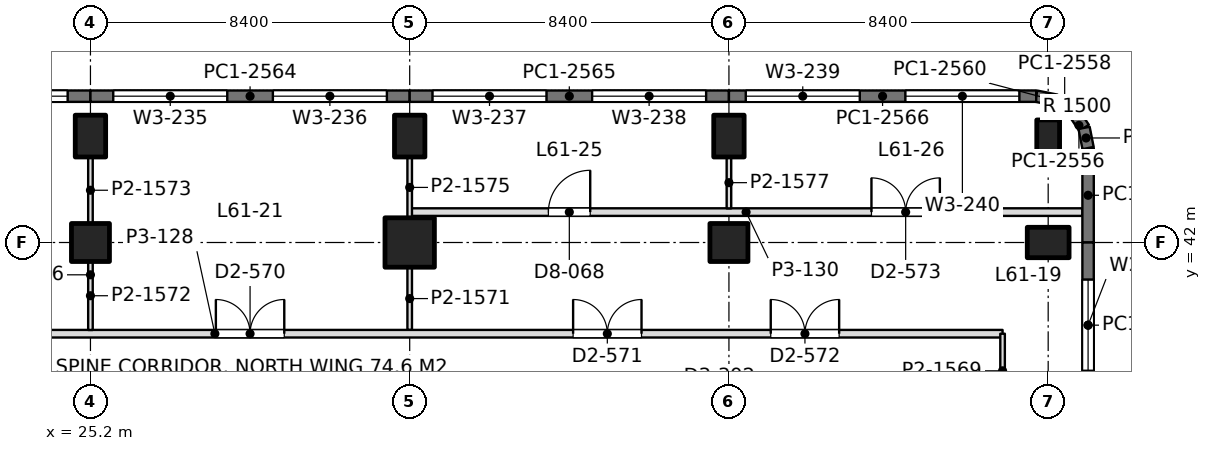
"""IFC4 building model, lengths in metres.
Left out: names, types, materials, properties, quantities, classifications, styles, units other than length and angle.
Written with IfcOpenShell. Run it as: python <this file> out.ifc"""

import sys

from ifc_helpers import new_model, si_unit, direction, frame, frame_2d, origin, origin_2d, place, context, subcontext, project, spatial, rectangle, extrude, element, fill, save


model = new_model("IFC4")
c1 = context("Model", 3, precision=1e-05, world=origin(), true_north=direction((0.0, 1.0)))
c2 = subcontext(c1, "Body", "Model", "MODEL_VIEW")
j1 = project(units=[si_unit("LENGTHUNIT", "METRE"), si_unit("PLANEANGLEUNIT", "RADIAN")], contexts=[c1])
p1 = place(None, origin())
s1 = spatial("IfcSite", under=j1, at=p1, CompositionType="ELEMENT")
p2 = place(p1, origin())
s2 = spatial("IfcBuilding", under=s1, at=p2, CompositionType="ELEMENT")
p3 = place(p2, frame((0.0, 0.0, 268.2)))
s3 = spatial("IfcBuildingStorey", under=s2, at=p3, CompositionType="ELEMENT", Elevation=268.2)
p4 = place(p3, frame((25.2, 42.0, 0.0), z_axis=(0.0, 0.0, 1.0), x_axis=(1.0, 0.0, 0.0)))
e1 = element("IfcColumn", 1, at=p4, inside=s3, PredefinedType="COLUMN", context=c2, shape_type="SweptSolid", body=[
    extrude(rectangle(XDim=1.0, YDim=1.0, at=origin_2d()), origin(), (0.0, 0.0, 1.0), 4.5),
])
p5 = place(p3, frame((25.2, 44.8, 0.0), z_axis=(0.0, 0.0, 1.0), x_axis=(1.0, 0.0, 0.0)))
e2 = element("IfcColumn", 2, at=p5, inside=s3, PredefinedType="COLUMN", context=c2, shape_type="SweptSolid", body=[
    extrude(rectangle(XDim=0.8, YDim=1.1, at=origin_2d()), origin(), (0.0, 0.0, 1.0), 4.5),
])
p6 = place(p3, frame((33.6, 42.0, 0.0), z_axis=(0.0, 0.0, 1.0), x_axis=(1.0, 0.0, 0.0)))
e3 = element("IfcColumn", 3, at=p6, inside=s3, PredefinedType="COLUMN", context=c2, shape_type="SweptSolid", body=[
    extrude(rectangle(XDim=1.3, YDim=1.3, at=origin_2d()), origin(), (0.0, 0.0, 1.0), 4.5),
])
p7 = place(p3, frame((33.6, 44.8, 0.0), z_axis=(0.0, 0.0, 1.0), x_axis=(1.0, 0.0, 0.0)))
e4 = element("IfcColumn", 4, at=p7, inside=s3, PredefinedType="COLUMN", context=c2, shape_type="SweptSolid", body=[
    extrude(rectangle(XDim=0.8, YDim=1.1, at=origin_2d()), origin(), (0.0, 0.0, 1.0), 4.5),
])
p8 = place(p3, frame((42.0, 42.0, 0.0), z_axis=(0.0, 0.0, 1.0), x_axis=(1.0, 0.0, 0.0)))
e5 = element("IfcColumn", 5, at=p8, inside=s3, PredefinedType="COLUMN", context=c2, shape_type="SweptSolid", body=[
    extrude(rectangle(XDim=1.0, YDim=1.0, at=origin_2d()), origin(), (0.0, 0.0, 1.0), 4.5),
])
for number, where, z_axis, x_axis in (
    (6, (42.0, 44.8, 0.0), (0.0, 0.0, 1.0), (1.0, 0.0, 0.0)),
    (7, (50.4, 42.0, 0.0), (0.0, 0.0, 1.0), (0.0, 1.0, 0.0)),
):
    element("IfcColumn", number, at=place(p3, frame(where, z_axis=z_axis, x_axis=x_axis)), inside=s3, PredefinedType="COLUMN", context=c2, shape_type="SweptSolid", body=[
        extrude(rectangle(XDim=0.8, YDim=1.1, at=origin_2d()), origin(), (0.0, 0.0, 1.0), 4.5),
    ])
p9 = place(p3, frame((50.4, 44.8, 0.0), z_axis=(0.0, 0.0, 1.0), x_axis=(1.0, 0.0, 0.0)))
e8 = element("IfcColumn", 8, at=p9, inside=s3, PredefinedType="COLUMN", context=c2, shape_type="SweptSolid", body=[
    extrude(rectangle(XDim=0.6, YDim=0.85, at=origin_2d()), origin(), (0.0, 0.0, 1.0), 4.5),
])
p10 = place(p3, frame((16.8, 45.85, 0.0), z_axis=(0.0, 0.0, 1.0), x_axis=(1.0, 0.0, 0.0)))
e9 = element("IfcWall", 9, at=p10, inside=s3, PredefinedType="SOLIDWALL", context=c2, shape_type="SweptSolid", body=[
    extrude(rectangle(XDim=8.4, YDim=0.3, at=frame_2d((4.2, 0.0))), origin(), (0.0, 0.0, 1.0), 4.35),
])
p11 = place(p10, frame((0.6, 0.0, 0.9)))
e10 = element("IfcOpeningElement", 10, at=p11, cuts=e9, PredefinedType="OPENING", context=c2, shape_type="SweptSolid", body=[
    extrude(rectangle(XDim=3.0, YDim=2.4, at=frame_2d((1.5, 1.2))), frame((0.0, 0.16, 0.0), z_axis=(0.0, -1.0, 0.0), x_axis=(1.0, 0.0, 0.0)), (0.0, 0.0, 1.0), 0.32),
])
p12 = place(p10, frame((4.8, 0.0, 0.9)))
e11 = element("IfcOpeningElement", 11, at=p12, cuts=e9, PredefinedType="OPENING", context=c2, shape_type="SweptSolid", body=[
    extrude(rectangle(XDim=3.0, YDim=2.4, at=frame_2d((1.5, 1.2))), frame((0.0, 0.16, 0.0), z_axis=(0.0, -1.0, 0.0), x_axis=(1.0, 0.0, 0.0)), (0.0, 0.0, 1.0), 0.32),
])
p13 = place(p3, frame((25.2, 45.85, 0.0), z_axis=(0.0, 0.0, 1.0), x_axis=(1.0, 0.0, 0.0)))
e12 = element("IfcWall", 12, at=p13, inside=s3, PredefinedType="SOLIDWALL", context=c2, shape_type="SweptSolid", body=[
    extrude(rectangle(XDim=8.4, YDim=0.3, at=frame_2d((4.2, 0.0))), origin(), (0.0, 0.0, 1.0), 4.35),
])
p14 = place(p13, frame((0.6, 0.0, 0.9)))
e13 = element("IfcOpeningElement", 13, at=p14, cuts=e12, PredefinedType="OPENING", context=c2, shape_type="SweptSolid", body=[
    extrude(rectangle(XDim=3.0, YDim=2.4, at=frame_2d((1.5, 1.2))), frame((0.0, 0.16, 0.0), z_axis=(0.0, -1.0, 0.0), x_axis=(1.0, 0.0, 0.0)), (0.0, 0.0, 1.0), 0.32),
])
p15 = place(p13, frame((4.8, 0.0, 0.9)))
e14 = element("IfcOpeningElement", 14, at=p15, cuts=e12, PredefinedType="OPENING", context=c2, shape_type="SweptSolid", body=[
    extrude(rectangle(XDim=3.0, YDim=2.4, at=frame_2d((1.5, 1.2))), frame((0.0, 0.16, 0.0), z_axis=(0.0, -1.0, 0.0), x_axis=(1.0, 0.0, 0.0)), (0.0, 0.0, 1.0), 0.32),
])
p16 = place(p3, frame((33.6, 45.85, 0.0), z_axis=(0.0, 0.0, 1.0), x_axis=(1.0, 0.0, 0.0)))
e15 = element("IfcWall", 15, at=p16, inside=s3, PredefinedType="SOLIDWALL", context=c2, shape_type="SweptSolid", body=[
    extrude(rectangle(XDim=8.4, YDim=0.3, at=frame_2d((4.2, 0.0))), origin(), (0.0, 0.0, 1.0), 4.35),
])
p17 = place(p16, frame((0.6, 0.0, 0.9)))
e16 = element("IfcOpeningElement", 16, at=p17, cuts=e15, PredefinedType="OPENING", context=c2, shape_type="SweptSolid", body=[
    extrude(rectangle(XDim=3.0, YDim=2.4, at=frame_2d((1.5, 1.2))), frame((0.0, 0.16, 0.0), z_axis=(0.0, -1.0, 0.0), x_axis=(1.0, 0.0, 0.0)), (0.0, 0.0, 1.0), 0.32),
])
p18 = place(p16, frame((4.8, 0.0, 0.9)))
e17 = element("IfcOpeningElement", 17, at=p18, cuts=e15, PredefinedType="OPENING", context=c2, shape_type="SweptSolid", body=[
    extrude(rectangle(XDim=3.0, YDim=2.4, at=frame_2d((1.5, 1.2))), frame((0.0, 0.16, 0.0), z_axis=(0.0, -1.0, 0.0), x_axis=(1.0, 0.0, 0.0)), (0.0, 0.0, 1.0), 0.32),
])
p19 = place(p3, frame((42.0, 45.85, 0.0), z_axis=(0.0, 0.0, 1.0), x_axis=(1.0, 0.0, 0.0)))
e18 = element("IfcWall", 18, at=p19, inside=s3, PredefinedType="SOLIDWALL", context=c2, shape_type="SweptSolid", body=[
    extrude(rectangle(XDim=8.085, YDim=0.3, at=frame_2d((4.042, 0.0))), origin(), (0.0, 0.0, 1.0), 4.35),
])
p20 = place(p19, frame((0.443, 0.0, 0.9)))
e19 = element("IfcOpeningElement", 19, at=p20, cuts=e18, PredefinedType="OPENING", context=c2, shape_type="SweptSolid", body=[
    extrude(rectangle(XDim=3.0, YDim=2.4, at=frame_2d((1.5, 1.2))), frame((0.0, 0.16, 0.0), z_axis=(0.0, -1.0, 0.0), x_axis=(1.0, 0.0, 0.0)), (0.0, 0.0, 1.0), 0.32),
])
p21 = place(p19, frame((4.643, 0.0, 0.9)))
e20 = element("IfcOpeningElement", 20, at=p21, cuts=e18, PredefinedType="OPENING", context=c2, shape_type="SweptSolid", body=[
    extrude(rectangle(XDim=3.0, YDim=2.4, at=frame_2d((1.5, 1.2))), frame((0.0, 0.16, 0.0), z_axis=(0.0, -1.0, 0.0), x_axis=(1.0, 0.0, 0.0)), (0.0, 0.0, 1.0), 0.32),
])
p22 = place(p3, frame((50.085, 45.85, 0.0), z_axis=(0.0, 0.0, 1.0), x_axis=(0.980702050465, -0.1955082817, 0.0)))
e21 = element("IfcWall", 21, at=p22, inside=s3, PredefinedType="SOLIDWALL", context=c2, shape_type="SweptSolid", body=[
    extrude(rectangle(XDim=0.541, YDim=0.3, at=frame_2d((0.271, 0.0))), origin(), (0.0, 0.0, 1.0), 4.35),
])
p23 = place(p3, frame((50.615, 45.744, 0.0), z_axis=(0.0, 0.0, 1.0), x_axis=(0.831692711774, -0.555236195849, 0.0)))
e22 = element("IfcWall", 22, at=p23, inside=s3, PredefinedType="SOLIDWALL", context=c2, shape_type="SweptSolid", body=[
    extrude(rectangle(XDim=0.525, YDim=0.3, at=frame_2d((0.263, 0.0))), origin(), (0.0, 0.0, 1.0), 4.35),
])
p24 = place(p3, frame((51.052, 45.453, 0.0), z_axis=(0.0, 0.0, 1.0), x_axis=(0.55534295404, -0.831621430339, 0.0)))
e23 = element("IfcWall", 23, at=p24, inside=s3, PredefinedType="SOLIDWALL", context=c2, shape_type="SweptSolid", body=[
    extrude(rectangle(XDim=0.526, YDim=0.3, at=frame_2d((0.263, 0.0))), origin(), (0.0, 0.0, 1.0), 4.35),
])
p25 = place(p3, frame((51.344, 45.015, 0.0), z_axis=(0.0, 0.0, 1.0), x_axis=(0.195073962632, -0.980788534345, 0.0)))
e24 = element("IfcWall", 24, at=p25, inside=s3, PredefinedType="SOLIDWALL", context=c2, shape_type="SweptSolid", body=[
    extrude(rectangle(XDim=0.541, YDim=0.3, at=frame_2d((0.271, 0.0))), origin(), (0.0, 0.0, 1.0), 4.35),
])
p26 = place(p3, frame((51.45, 44.485, 0.0), z_axis=(0.0, 0.0, 1.0), x_axis=(0.0, -1.0, 0.0)))
e25 = element("IfcWall", 25, at=p26, inside=s3, PredefinedType="SOLIDWALL", context=c2, shape_type="SweptSolid", body=[
    extrude(rectangle(XDim=2.485, YDim=0.3, at=frame_2d((1.243, 0.0))), origin(), (0.0, 0.0, 1.0), 4.35),
])
p27 = place(p3, frame((51.45, 42.0, 0.0), z_axis=(0.0, 0.0, 1.0), x_axis=(0.0, -1.0, 0.0)))
e26 = element("IfcWall", 26, at=p27, inside=s3, PredefinedType="SOLIDWALL", context=c2, shape_type="SweptSolid", body=[
    extrude(rectangle(XDim=4.35, YDim=0.3, at=frame_2d((2.175, 0.0))), origin(), (0.0, 0.0, 1.0), 4.35),
])
p28 = place(p27, frame((0.975, 0.0, 0.9)))
e27 = element("IfcOpeningElement", 27, at=p28, cuts=e26, PredefinedType="OPENING", context=c2, shape_type="SweptSolid", body=[
    extrude(rectangle(XDim=2.4, YDim=1.9, at=frame_2d((1.2, 0.95))), frame((0.0, 0.16, 0.0), z_axis=(0.0, -1.0, 0.0), x_axis=(1.0, 0.0, 0.0)), (0.0, 0.0, 1.0), 0.32),
])
p29 = place(p3, frame((33.6, 42.8, 0.0), z_axis=(0.0, 0.0, 1.0), x_axis=(1.0, 0.0, 0.0)))
e28 = element("IfcWall", 28, at=p29, inside=s3, PredefinedType="PARTITIONING", context=c2, shape_type="SweptSolid", body=[
    extrude(rectangle(XDim=17.702, YDim=0.2, at=frame_2d((8.851, 0.0))), origin(), (0.0, 0.0, 1.0), 3.86),
])
p30 = place(p29, frame((3.65, 0.0, 0.0)))
e29 = element("IfcOpeningElement", 29, at=p30, cuts=e28, PredefinedType="OPENING", context=c2, shape_type="SweptSolid", body=[
    extrude(rectangle(XDim=1.1, YDim=2.4, at=frame_2d((0.55, 1.2))), frame((0.0, 0.11, 0.0), z_axis=(0.0, -1.0, 0.0), x_axis=(1.0, 0.0, 0.0)), (0.0, 0.0, 1.0), 0.22),
])
p31 = place(p29, frame((12.15, 0.0, 0.0)))
e30 = element("IfcOpeningElement", 30, at=p31, cuts=e28, PredefinedType="OPENING", context=c2, shape_type="SweptSolid", body=[
    extrude(rectangle(XDim=1.8, YDim=2.2, at=frame_2d((0.9, 1.1))), frame((0.0, 0.11, 0.0), z_axis=(0.0, -1.0, 0.0), x_axis=(1.0, 0.0, 0.0)), (0.0, 0.0, 1.0), 0.22),
])
p32 = place(p3, frame((33.6, 42.648, 0.0), z_axis=(0.0, 0.0, 1.0), x_axis=(0.0, 1.0, 0.0)))
e31 = element("IfcWall", 31, at=p32, inside=s3, PredefinedType="PARTITIONING", context=c2, shape_type="SweptSolid", body=[
    extrude(rectangle(XDim=1.603, YDim=0.12, at=frame_2d((0.802, 0.0))), origin(), (0.0, 0.0, 1.0), 3.99),
])
p33 = place(p3, frame((42.0, 42.898, 0.0), z_axis=(0.0, 0.0, 1.0), x_axis=(0.0, 1.0, 0.0)))
e32 = element("IfcWall", 32, at=p33, inside=s3, PredefinedType="PARTITIONING", context=c2, shape_type="SweptSolid", body=[
    extrude(rectangle(XDim=1.353, YDim=0.12, at=frame_2d((0.677, 0.0))), origin(), (0.0, 0.0, 1.0), 3.99),
])
p34 = place(p3, frame((25.2, 39.698, 0.0), z_axis=(0.0, 0.0, 1.0), x_axis=(0.0, 1.0, 0.0)))
e33 = element("IfcWall", 33, at=p34, inside=s3, PredefinedType="PARTITIONING", context=c2, shape_type="SweptSolid", body=[
    extrude(rectangle(XDim=1.803, YDim=0.12, at=frame_2d((0.901, 0.0))), origin(), (0.0, 0.0, 1.0), 3.8),
])
p35 = place(p3, frame((25.2, 42.499, 0.0), z_axis=(0.0, 0.0, 1.0), x_axis=(0.0, 1.0, 0.0)))
e34 = element("IfcWall", 34, at=p35, inside=s3, PredefinedType="PARTITIONING", context=c2, shape_type="SweptSolid", body=[
    extrude(rectangle(XDim=1.752, YDim=0.12, at=frame_2d((0.876, 0.0))), origin(), (0.0, 0.0, 1.0), 3.99),
])
p36 = place(p3, frame((33.6, 39.698, 0.0), z_axis=(0.0, 0.0, 1.0), x_axis=(0.0, 1.0, 0.0)))
e35 = element("IfcWall", 35, at=p36, inside=s3, PredefinedType="PARTITIONING", context=c2, shape_type="SweptSolid", body=[
    extrude(rectangle(XDim=1.653, YDim=0.12, at=frame_2d((0.827, 0.0))), origin(), (0.0, 0.0, 1.0), 3.99),
])
p37 = place(p3, frame((7.748, 39.6, 0.0), z_axis=(0.0, 0.0, 1.0), x_axis=(1.0, 0.0, 0.0)))
e36 = element("IfcWall", 36, at=p37, inside=s3, PredefinedType="PARTITIONING", context=c2, shape_type="SweptSolid", body=[
    extrude(rectangle(XDim=41.452, YDim=0.2, at=frame_2d((20.726, 0.0))), origin(), (0.0, 0.0, 1.0), 3.8),
])
p38 = place(p37, frame((2.119, 0.0, 0.0)))
e37 = element("IfcOpeningElement", 37, at=p38, cuts=e36, PredefinedType="OPENING", context=c2, shape_type="SweptSolid", body=[
    extrude(rectangle(XDim=1.8, YDim=2.2, at=frame_2d((0.9, 1.1))), frame((0.0, 0.11, 0.0), z_axis=(0.0, -1.0, 0.0), x_axis=(1.0, 0.0, 0.0)), (0.0, 0.0, 1.0), 0.22),
])
p39 = place(p37, frame((5.135, 0.0, 0.0)))
e38 = element("IfcOpeningElement", 38, at=p39, cuts=e36, PredefinedType="OPENING", context=c2, shape_type="SweptSolid", body=[
    extrude(rectangle(XDim=1.8, YDim=2.2, at=frame_2d((0.9, 1.1))), frame((0.0, 0.11, 0.0), z_axis=(0.0, -1.0, 0.0), x_axis=(1.0, 0.0, 0.0)), (0.0, 0.0, 1.0), 0.22),
])
p40 = place(p37, frame((12.352, 0.0, 0.0)))
e39 = element("IfcOpeningElement", 39, at=p40, cuts=e36, PredefinedType="OPENING", context=c2, shape_type="SweptSolid", body=[
    extrude(rectangle(XDim=1.8, YDim=2.2, at=frame_2d((0.9, 1.1))), frame((0.0, 0.11, 0.0), z_axis=(0.0, -1.0, 0.0), x_axis=(1.0, 0.0, 0.0)), (0.0, 0.0, 1.0), 0.22),
])
p41 = place(p37, frame((20.752, 0.0, 0.0)))
e40 = element("IfcOpeningElement", 40, at=p41, cuts=e36, PredefinedType="OPENING", context=c2, shape_type="SweptSolid", body=[
    extrude(rectangle(XDim=1.8, YDim=2.2, at=frame_2d((0.9, 1.1))), frame((0.0, 0.11, 0.0), z_axis=(0.0, -1.0, 0.0), x_axis=(1.0, 0.0, 0.0)), (0.0, 0.0, 1.0), 0.22),
])
p42 = place(p37, frame((30.152, 0.0, 0.0)))
e41 = element("IfcOpeningElement", 41, at=p42, cuts=e36, PredefinedType="OPENING", context=c2, shape_type="SweptSolid", body=[
    extrude(rectangle(XDim=1.8, YDim=2.2, at=frame_2d((0.9, 1.1))), frame((0.0, 0.11, 0.0), z_axis=(0.0, -1.0, 0.0), x_axis=(1.0, 0.0, 0.0)), (0.0, 0.0, 1.0), 0.22),
])
p43 = place(p37, frame((35.352, 0.0, 0.0)))
e42 = element("IfcOpeningElement", 42, at=p43, cuts=e36, PredefinedType="OPENING", context=c2, shape_type="SweptSolid", body=[
    extrude(rectangle(XDim=1.8, YDim=2.2, at=frame_2d((0.9, 1.1))), frame((0.0, 0.11, 0.0), z_axis=(0.0, -1.0, 0.0), x_axis=(1.0, 0.0, 0.0)), (0.0, 0.0, 1.0), 0.22),
])
p44 = place(p3, frame((49.2, 37.648, 0.0), z_axis=(0.0, 0.0, 1.0), x_axis=(0.0, 1.0, 0.0)))
e43 = element("IfcWall", 43, at=p44, inside=s3, PredefinedType="PARTITIONING", context=c2, shape_type="SweptSolid", body=[
    extrude(rectangle(XDim=1.952, YDim=0.12, at=frame_2d((0.976, 0.0))), origin(), (0.0, 0.0, 1.0), 4.35),
])
p45 = place(p12, origin())
e44 = element("IfcWindow", 44, at=p45, inside=s3, PartitioningType="SINGLE_PANEL", PredefinedType="WINDOW", context=c2, shape_type="SweptSolid", body=[
    extrude(rectangle(XDim=3.0, YDim=2.4, at=frame_2d((1.5, 1.2))), frame((0.0, 0.03, 0.0), z_axis=(0.0, -1.0, 0.0), x_axis=(1.0, 0.0, 0.0)), (0.0, 0.0, 1.0), 0.06),
])
fill(e11, e44)
p46 = place(p14, origin())
e45 = element("IfcWindow", 45, at=p46, inside=s3, PartitioningType="SINGLE_PANEL", PredefinedType="WINDOW", context=c2, shape_type="SweptSolid", body=[
    extrude(rectangle(XDim=3.0, YDim=2.4, at=frame_2d((1.5, 1.2))), frame((0.0, 0.03, 0.0), z_axis=(0.0, -1.0, 0.0), x_axis=(1.0, 0.0, 0.0)), (0.0, 0.0, 1.0), 0.06),
])
fill(e13, e45)
p47 = place(p15, origin())
e46 = element("IfcWindow", 46, at=p47, inside=s3, PartitioningType="SINGLE_PANEL", PredefinedType="WINDOW", context=c2, shape_type="SweptSolid", body=[
    extrude(rectangle(XDim=3.0, YDim=2.4, at=frame_2d((1.5, 1.2))), frame((0.0, 0.03, 0.0), z_axis=(0.0, -1.0, 0.0), x_axis=(1.0, 0.0, 0.0)), (0.0, 0.0, 1.0), 0.06),
])
fill(e14, e46)
p48 = place(p17, origin())
e47 = element("IfcWindow", 47, at=p48, inside=s3, PartitioningType="SINGLE_PANEL", PredefinedType="WINDOW", context=c2, shape_type="SweptSolid", body=[
    extrude(rectangle(XDim=3.0, YDim=2.4, at=frame_2d((1.5, 1.2))), frame((0.0, 0.03, 0.0), z_axis=(0.0, -1.0, 0.0), x_axis=(1.0, 0.0, 0.0)), (0.0, 0.0, 1.0), 0.06),
])
fill(e16, e47)
p49 = place(p18, origin())
e48 = element("IfcWindow", 48, at=p49, inside=s3, PartitioningType="SINGLE_PANEL", PredefinedType="WINDOW", context=c2, shape_type="SweptSolid", body=[
    extrude(rectangle(XDim=3.0, YDim=2.4, at=frame_2d((1.5, 1.2))), frame((0.0, 0.03, 0.0), z_axis=(0.0, -1.0, 0.0), x_axis=(1.0, 0.0, 0.0)), (0.0, 0.0, 1.0), 0.06),
])
fill(e17, e48)
p50 = place(p20, origin())
e49 = element("IfcWindow", 49, at=p50, inside=s3, PartitioningType="SINGLE_PANEL", PredefinedType="WINDOW", context=c2, shape_type="SweptSolid", body=[
    extrude(rectangle(XDim=3.0, YDim=2.4, at=frame_2d((1.5, 1.2))), frame((0.0, 0.03, 0.0), z_axis=(0.0, -1.0, 0.0), x_axis=(1.0, 0.0, 0.0)), (0.0, 0.0, 1.0), 0.06),
])
fill(e19, e49)
p51 = place(p21, origin())
e50 = element("IfcWindow", 50, at=p51, inside=s3, PartitioningType="SINGLE_PANEL", PredefinedType="WINDOW", context=c2, shape_type="SweptSolid", body=[
    extrude(rectangle(XDim=3.0, YDim=2.4, at=frame_2d((1.5, 1.2))), frame((0.0, 0.03, 0.0), z_axis=(0.0, -1.0, 0.0), x_axis=(1.0, 0.0, 0.0)), (0.0, 0.0, 1.0), 0.06),
])
fill(e20, e50)
p52 = place(p28, origin())
e51 = element("IfcWindow", 51, at=p52, inside=s3, PartitioningType="SINGLE_PANEL", PredefinedType="WINDOW", context=c2, shape_type="SweptSolid", body=[
    extrude(rectangle(XDim=2.4, YDim=1.9, at=frame_2d((1.2, 0.95))), frame((0.0, 0.03, 0.0), z_axis=(0.0, -1.0, 0.0), x_axis=(1.0, 0.0, 0.0)), (0.0, 0.0, 1.0), 0.06),
])
fill(e27, e51)
p53 = place(p30, origin())
e52 = element("IfcDoor", 52, at=p53, inside=s3, OperationType="SINGLE_SWING_RIGHT", PredefinedType="DOOR", context=c2, shape_type="SweptSolid", body=[
    extrude(rectangle(XDim=1.1, YDim=2.4, at=frame_2d((0.55, 1.2))), frame((0.0, 0.025, 0.0), z_axis=(0.0, -1.0, 0.0), x_axis=(1.0, 0.0, 0.0)), (0.0, 0.0, 1.0), 0.05),
])
fill(e29, e52)
p54 = place(p31, origin())
e53 = element("IfcDoor", 53, at=p54, inside=s3, OperationType="DOUBLE_DOOR_SINGLE_SWING", PredefinedType="DOOR", context=c2, shape_type="SweptSolid", body=[
    extrude(rectangle(XDim=1.8, YDim=2.2, at=frame_2d((0.9, 1.1))), frame((0.0, 0.025, 0.0), z_axis=(0.0, -1.0, 0.0), x_axis=(1.0, 0.0, 0.0)), (0.0, 0.0, 1.0), 0.05),
])
fill(e30, e53)
p55 = place(p41, origin())
e54 = element("IfcDoor", 54, at=p55, inside=s3, OperationType="DOUBLE_DOOR_SINGLE_SWING", PredefinedType="DOOR", context=c2, shape_type="SweptSolid", body=[
    extrude(rectangle(XDim=1.8, YDim=2.2, at=frame_2d((0.9, 1.1))), frame((0.0, 0.025, 0.0), z_axis=(0.0, -1.0, 0.0), x_axis=(1.0, 0.0, 0.0)), (0.0, 0.0, 1.0), 0.05),
])
fill(e40, e54)
p56 = place(p42, origin())
e55 = element("IfcDoor", 55, at=p56, inside=s3, OperationType="DOUBLE_DOOR_SINGLE_SWING", PredefinedType="DOOR", context=c2, shape_type="SweptSolid", body=[
    extrude(rectangle(XDim=1.8, YDim=2.2, at=frame_2d((0.9, 1.1))), frame((0.0, 0.025, 0.0), z_axis=(0.0, -1.0, 0.0), x_axis=(1.0, 0.0, 0.0)), (0.0, 0.0, 1.0), 0.05),
])
fill(e41, e55)
p57 = place(p43, origin())
e56 = element("IfcDoor", 56, at=p57, inside=s3, OperationType="DOUBLE_DOOR_SINGLE_SWING", PredefinedType="DOOR", context=c2, shape_type="SweptSolid", body=[
    extrude(rectangle(XDim=1.8, YDim=2.2, at=frame_2d((0.9, 1.1))), frame((0.0, 0.025, 0.0), z_axis=(0.0, -1.0, 0.0), x_axis=(1.0, 0.0, 0.0)), (0.0, 0.0, 1.0), 0.05),
])
fill(e42, e56)
save(model, sys.argv[1])
